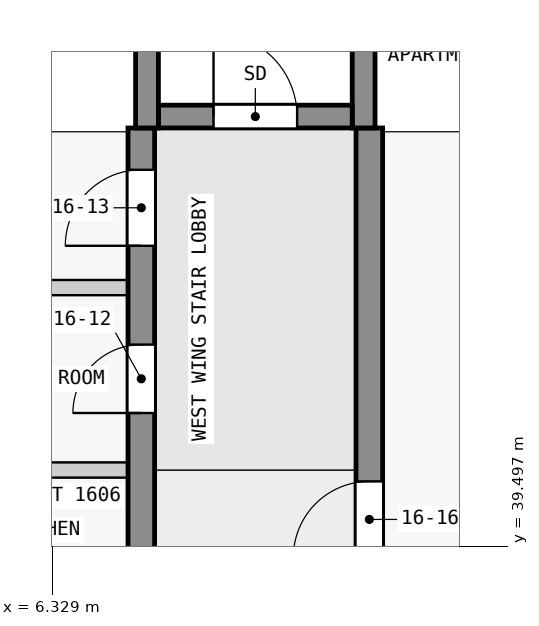
"""IFC4 building model, lengths in metres.
Left out: names, types, materials, properties, quantities, classifications, styles, units other than length and angle.
Written with IfcOpenShell. Run it as: python <this file> out.ifc"""

import sys

from ifc_helpers import new_model, si_unit, direction, frame, frame_2d, origin, place, context, subcontext, project, spatial, rectangle, extrude, element, fill, save


model = new_model("IFC4")
c1 = context("Model", 3, precision=1e-05, world=origin(), true_north=direction((0.0, 1.0)))
c2 = subcontext(c1, "Body", "Model", "MODEL_VIEW")
j1 = project(units=[si_unit("LENGTHUNIT", "METRE"), si_unit("PLANEANGLEUNIT", "RADIAN")], contexts=[c1])
p1 = place(None, origin())
s1 = spatial("IfcSite", under=j1, at=p1, CompositionType="ELEMENT")
p2 = place(p1, origin())
s2 = spatial("IfcBuilding", under=s1, at=p2, CompositionType="ELEMENT")
p3 = place(p2, frame((0.0, 0.0, 65.3)))
s3 = spatial("IfcBuildingStorey", under=s2, at=p3, CompositionType="ELEMENT", Elevation=65.3)
p4 = place(p3, frame((7.725, 45.15, 0.0), z_axis=(0.0, 0.0, 1.0), x_axis=(1.0, 0.0, 0.0)))
e1 = element("IfcWall", 1, at=p4, inside=s3, PredefinedType="SHEAR", context=c2, shape_type="SweptSolid", body=[
    extrude(rectangle(XDim=2.55, YDim=0.3, at=frame_2d((1.275, 0.0))), origin(), (0.0, 0.0, 1.0), 3.5),
])
p5 = place(p4, frame((0.725, 0.0, 0.0)))
e2 = element("IfcOpeningElement", 2, at=p5, cuts=e1, PredefinedType="OPENING", context=c2, shape_type="SweptSolid", body=[
    extrude(rectangle(XDim=1.1, YDim=2.1, at=frame_2d((0.55, 1.05))), frame((0.0, 0.16, 0.0), z_axis=(0.0, -1.0, 0.0), x_axis=(1.0, 0.0, 0.0)), (0.0, 0.0, 1.0), 0.32),
])
for number, where, z_axis, x_axis in (
    (3, (7.575, 45.0, 0.0), (0.0, 0.0, 1.0), (0.0, 1.0, 0.0)),
    (4, (10.425, 45.0, 0.0), (0.0, 0.0, 1.0), (0.0, 1.0, 0.0)),
):
    element("IfcWall", number, at=place(p3, frame(where, z_axis=z_axis, x_axis=x_axis)), inside=s3, PredefinedType="SHEAR", context=c2, shape_type="SweptSolid", body=[
        extrude(rectangle(XDim=7.2, YDim=0.3, at=frame_2d((3.6, 0.0))), origin(), (0.0, 0.0, 1.0), 3.5),
    ])
p6 = place(p3, frame((7.5, 18.0, 0.0), z_axis=(0.0, 0.0, 1.0), x_axis=(0.0, 1.0, 0.0)))
e5 = element("IfcWall", 5, at=p6, inside=s3, PredefinedType="SHEAR", context=c2, shape_type="SweptSolid", body=[
    extrude(rectangle(XDim=27.0, YDim=0.35, at=frame_2d((13.5, 0.0))), origin(), (0.0, 0.0, 1.0), 3.25),
])
p7 = place(p6, frame((1.75, 0.0, 0.0)))
e6 = element("IfcOpeningElement", 6, at=p7, cuts=e5, PredefinedType="OPENING", context=c2, shape_type="SweptSolid", body=[
    extrude(rectangle(XDim=1.0, YDim=2.1, at=frame_2d((0.5, 1.05))), frame((0.0, 0.185, 0.0), z_axis=(0.0, -1.0, 0.0), x_axis=(1.0, 0.0, 0.0)), (0.0, 0.0, 1.0), 0.37),
])
p8 = place(p6, frame((6.25, 0.0, 0.0)))
e7 = element("IfcOpeningElement", 7, at=p8, cuts=e5, PredefinedType="OPENING", context=c2, shape_type="SweptSolid", body=[
    extrude(rectangle(XDim=1.0, YDim=2.1, at=frame_2d((0.5, 1.05))), frame((0.0, 0.185, 0.0), z_axis=(0.0, -1.0, 0.0), x_axis=(1.0, 0.0, 0.0)), (0.0, 0.0, 1.0), 0.37),
])
p9 = place(p6, frame((10.75, 0.0, 0.0)))
e8 = element("IfcOpeningElement", 8, at=p9, cuts=e5, PredefinedType="OPENING", context=c2, shape_type="SweptSolid", body=[
    extrude(rectangle(XDim=1.0, YDim=2.1, at=frame_2d((0.5, 1.05))), frame((0.0, 0.185, 0.0), z_axis=(0.0, -1.0, 0.0), x_axis=(1.0, 0.0, 0.0)), (0.0, 0.0, 1.0), 0.37),
])
p10 = place(p6, frame((17.55, 0.0, 0.0)))
e9 = element("IfcOpeningElement", 9, at=p10, cuts=e5, PredefinedType="OPENING", context=c2, shape_type="SweptSolid", body=[
    extrude(rectangle(XDim=1.0, YDim=2.1, at=frame_2d((0.5, 1.05))), frame((0.0, 0.185, 0.0), z_axis=(0.0, -1.0, 0.0), x_axis=(1.0, 0.0, 0.0)), (0.0, 0.0, 1.0), 0.37),
])
p11 = place(p6, frame((23.25, 0.0, 0.0)))
e10 = element("IfcOpeningElement", 10, at=p11, cuts=e5, PredefinedType="OPENING", context=c2, shape_type="SweptSolid", body=[
    extrude(rectangle(XDim=0.9, YDim=2.1, at=frame_2d((0.45, 1.05))), frame((0.0, 0.185, 0.0), z_axis=(0.0, -1.0, 0.0), x_axis=(1.0, 0.0, 0.0)), (0.0, 0.0, 1.0), 0.37),
])
p12 = place(p6, frame((25.45, 0.0, 0.0)))
e11 = element("IfcOpeningElement", 11, at=p12, cuts=e5, PredefinedType="OPENING", context=c2, shape_type="SweptSolid", body=[
    extrude(rectangle(XDim=1.0, YDim=2.1, at=frame_2d((0.5, 1.05))), frame((0.0, 0.185, 0.0), z_axis=(0.0, -1.0, 0.0), x_axis=(1.0, 0.0, 0.0)), (0.0, 0.0, 1.0), 0.37),
])
p13 = place(p3, frame((10.5, 18.0, 0.0), z_axis=(0.0, 0.0, 1.0), x_axis=(0.0, 1.0, 0.0)))
e12 = element("IfcWall", 12, at=p13, inside=s3, PredefinedType="SHEAR", context=c2, shape_type="SweptSolid", body=[
    extrude(rectangle(XDim=27.0, YDim=0.35, at=frame_2d((13.5, 0.0))), origin(), (0.0, 0.0, 1.0), 3.25),
])
p14 = place(p13, frame((4.05, 0.0, 0.0)))
e13 = element("IfcOpeningElement", 13, at=p14, cuts=e12, PredefinedType="OPENING", context=c2, shape_type="SweptSolid", body=[
    extrude(rectangle(XDim=1.0, YDim=2.1, at=frame_2d((0.5, 1.05))), frame((0.0, 0.185, 0.0), z_axis=(0.0, -1.0, 0.0), x_axis=(1.0, 0.0, 0.0)), (0.0, 0.0, 1.0), 0.37),
])
p15 = place(p13, frame((13.05, 0.0, 0.0)))
e14 = element("IfcOpeningElement", 14, at=p15, cuts=e12, PredefinedType="OPENING", context=c2, shape_type="SweptSolid", body=[
    extrude(rectangle(XDim=1.0, YDim=2.1, at=frame_2d((0.5, 1.05))), frame((0.0, 0.185, 0.0), z_axis=(0.0, -1.0, 0.0), x_axis=(1.0, 0.0, 0.0)), (0.0, 0.0, 1.0), 0.37),
])
p16 = place(p13, frame((21.35, 0.0, 0.0)))
e15 = element("IfcOpeningElement", 15, at=p16, cuts=e12, PredefinedType="OPENING", context=c2, shape_type="SweptSolid", body=[
    extrude(rectangle(XDim=1.0, YDim=2.1, at=frame_2d((0.5, 1.05))), frame((0.0, 0.185, 0.0), z_axis=(0.0, -1.0, 0.0), x_axis=(1.0, 0.0, 0.0)), (0.0, 0.0, 1.0), 0.37),
])
p17 = place(p3, frame((7.325, 40.5, 0.0), z_axis=(0.0, 0.0, 1.0), x_axis=(-1.0, 0.0, 0.0)))
e16 = element("IfcWall", 16, at=p17, inside=s3, PredefinedType="PARTITIONING", context=c2, shape_type="SweptSolid", body=[
    extrude(rectangle(XDim=2.3, YDim=0.2, at=frame_2d((1.15, 0.0))), origin(), (0.0, 0.0, 1.0), 3.25),
])
p18 = place(p3, frame((7.325, 42.9, 0.0), z_axis=(0.0, 0.0, 1.0), x_axis=(-1.0, 0.0, 0.0)))
e17 = element("IfcWall", 17, at=p18, inside=s3, PredefinedType="PARTITIONING", context=c2, shape_type="SweptSolid", body=[
    extrude(rectangle(XDim=2.4, YDim=0.2, at=frame_2d((1.2, 0.0))), origin(), (0.0, 0.0, 1.0), 3.25),
])
p19 = place(p5, origin())
e18 = element("IfcDoor", 18, at=p19, inside=s3, OperationType="SINGLE_SWING_LEFT", PredefinedType="DOOR", context=c2, shape_type="SweptSolid", body=[
    extrude(rectangle(XDim=1.1, YDim=2.1, at=frame_2d((0.55, 1.05))), frame((0.0, 0.025, 0.0), z_axis=(0.0, -1.0, 0.0), x_axis=(1.0, 0.0, 0.0)), (0.0, 0.0, 1.0), 0.05),
])
fill(e2, e18)
p20 = place(p11, origin())
e19 = element("IfcDoor", 19, at=p20, inside=s3, OperationType="SINGLE_SWING_RIGHT", PredefinedType="DOOR", context=c2, shape_type="SweptSolid", body=[
    extrude(rectangle(XDim=0.9, YDim=2.1, at=frame_2d((0.45, 1.05))), frame((0.0, 0.025, 0.0), z_axis=(0.0, -1.0, 0.0), x_axis=(1.0, 0.0, 0.0)), (0.0, 0.0, 1.0), 0.05),
])
fill(e10, e19)
p21 = place(p12, origin())
e20 = element("IfcDoor", 20, at=p21, inside=s3, OperationType="SINGLE_SWING_RIGHT", PredefinedType="DOOR", context=c2, shape_type="SweptSolid", body=[
    extrude(rectangle(XDim=1.0, YDim=2.1, at=frame_2d((0.5, 1.05))), frame((0.0, 0.025, 0.0), z_axis=(0.0, -1.0, 0.0), x_axis=(1.0, 0.0, 0.0)), (0.0, 0.0, 1.0), 0.05),
])
fill(e11, e20)
p22 = place(p16, origin())
e21 = element("IfcDoor", 21, at=p22, inside=s3, OperationType="SINGLE_SWING_RIGHT", PredefinedType="DOOR", context=c2, shape_type="SweptSolid", body=[
    extrude(rectangle(XDim=1.0, YDim=2.1, at=frame_2d((0.5, 1.05))), frame((0.0, 0.025, 0.0), z_axis=(0.0, -1.0, 0.0), x_axis=(1.0, 0.0, 0.0)), (0.0, 0.0, 1.0), 0.05),
])
fill(e15, e21)
save(model, sys.argv[1])
